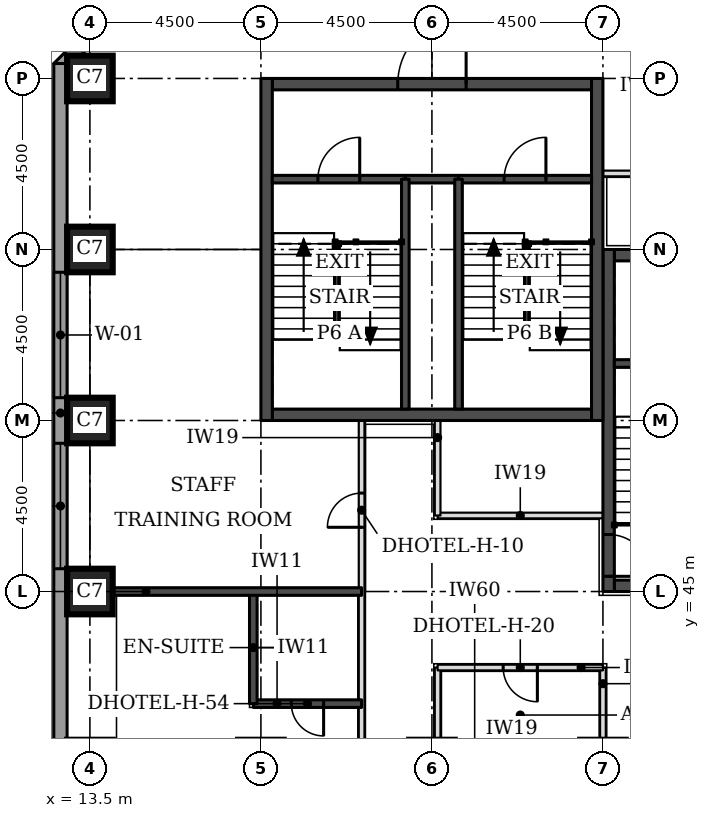
"""IFC4 building model, lengths in metres.
Left out: names, types, materials, properties, quantities, classifications, styles, units other than length and angle.
Written with IfcOpenShell. Run it as: python <this file> out.ifc"""

import sys

from ifc_helpers import new_model, si_unit, direction, frame, frame_2d, origin, origin_2d, place, context, subcontext, project, spatial, rectangle, extrude, element, fill, save


model = new_model("IFC4")
c1 = context("Model", 3, precision=1e-05, world=origin(), true_north=direction((0.0, 1.0)))
c2 = subcontext(c1, "Body", "Model", "MODEL_VIEW")
j1 = project(units=[si_unit("LENGTHUNIT", "METRE"), si_unit("PLANEANGLEUNIT", "RADIAN")], contexts=[c1])
p1 = place(None, origin())
s1 = spatial("IfcSite", under=j1, at=p1, CompositionType="ELEMENT")
p2 = place(p1, origin())
s2 = spatial("IfcBuilding", under=s1, at=p2, CompositionType="ELEMENT")
p3 = place(p2, frame((0.0, 0.0, 46.2)))
s3 = spatial("IfcBuildingStorey", under=s2, at=p3, CompositionType="ELEMENT", Elevation=46.2)
for number, where, z_axis, x_axis in (
    (1, (13.5, 45.0, 0.0), (0.0, 0.0, 1.0), (1.0, 0.0, 0.0)),
    (2, (13.5, 49.5, 0.0), (0.0, 0.0, 1.0), (1.0, 0.0, 0.0)),
    (3, (13.5, 54.0, 0.0), (0.0, 0.0, 1.0), (1.0, 0.0, 0.0)),
    (4, (13.5, 58.5, 0.0), (0.0, 0.0, 1.0), (1.0, 0.0, 0.0)),
):
    element("IfcColumn", number, at=place(p3, frame(where, z_axis=z_axis, x_axis=x_axis)), inside=s3, PredefinedType="COLUMN", context=c2, shape_type="SweptSolid", body=[
        extrude(rectangle(XDim=1.2, YDim=1.2, at=origin_2d()), origin(), (0.0, 0.0, 1.0), 3.3),
    ])
p4 = place(p3, frame((27.3, 45.15, 0.0), z_axis=(0.0, 0.0, 1.0), x_axis=(1.0, 0.0, 0.0)))
e5 = element("IfcWall", 5, at=p4, inside=s3, PredefinedType="SHEAR", context=c2, shape_type="SweptSolid", body=[
    extrude(rectangle(XDim=8.4, YDim=0.3, at=frame_2d((4.2, 0.0))), origin(), (0.0, 0.0, 1.0), 3.3),
])
p5 = place(p4, frame((5.2, 0.0, 0.0)))
e6 = element("IfcOpeningElement", 6, at=p5, cuts=e5, PredefinedType="OPENING", context=c2, shape_type="SweptSolid", body=[
    extrude(rectangle(XDim=1.0, YDim=2.1, at=frame_2d((0.5, 1.05))), frame((0.0, 0.16, 0.0), z_axis=(0.0, -1.0, 0.0), x_axis=(1.0, 0.0, 0.0)), (0.0, 0.0, 1.0), 0.32),
])
p6 = place(p3, frame((27.3, 53.85, 0.0), z_axis=(0.0, 0.0, 1.0), x_axis=(1.0, 0.0, 0.0)))
e7 = element("IfcWall", 7, at=p6, inside=s3, PredefinedType="SHEAR", context=c2, shape_type="SweptSolid", body=[
    extrude(rectangle(XDim=8.4, YDim=0.3, at=frame_2d((4.2, 0.0))), origin(), (0.0, 0.0, 1.0), 3.3),
])
p7 = place(p6, frame((6.4, 0.0, 0.0)))
e8 = element("IfcOpeningElement", 8, at=p7, cuts=e7, PredefinedType="OPENING", context=c2, shape_type="SweptSolid", body=[
    extrude(rectangle(XDim=1.1, YDim=2.1, at=frame_2d((0.55, 1.05))), frame((0.0, 0.16, 0.0), z_axis=(0.0, -1.0, 0.0), x_axis=(1.0, 0.0, 0.0)), (0.0, 0.0, 1.0), 0.32),
])
p8 = place(p3, frame((27.15, 45.0, 0.0), z_axis=(0.0, 0.0, 1.0), x_axis=(0.0, 1.0, 0.0)))
e9 = element("IfcWall", 9, at=p8, inside=s3, PredefinedType="SHEAR", context=c2, shape_type="SweptSolid", body=[
    extrude(rectangle(XDim=9.0, YDim=0.3, at=frame_2d((4.5, 0.0))), origin(), (0.0, 0.0, 1.0), 3.3),
])
p9 = place(p8, frame((0.4, 0.0, 0.0)))
e10 = element("IfcOpeningElement", 10, at=p9, cuts=e9, PredefinedType="OPENING", context=c2, shape_type="SweptSolid", body=[
    extrude(rectangle(XDim=1.1, YDim=2.1, at=frame_2d((0.55, 1.05))), frame((0.0, 0.16, 0.0), z_axis=(0.0, -1.0, 0.0), x_axis=(1.0, 0.0, 0.0)), (0.0, 0.0, 1.0), 0.32),
])
p10 = place(p3, frame((18.3, 49.65, 0.0), z_axis=(0.0, 0.0, 1.0), x_axis=(1.0, 0.0, 0.0)))
e11 = element("IfcWall", 11, at=p10, inside=s3, PredefinedType="SHEAR", context=c2, shape_type="SweptSolid", body=[
    extrude(rectangle(XDim=8.4, YDim=0.3, at=frame_2d((4.2, 0.0))), origin(), (0.0, 0.0, 1.0), 3.3),
])
p11 = place(p3, frame((18.3, 58.35, 0.0), z_axis=(0.0, 0.0, 1.0), x_axis=(1.0, 0.0, 0.0)))
e12 = element("IfcWall", 12, at=p11, inside=s3, PredefinedType="SHEAR", context=c2, shape_type="SweptSolid", body=[
    extrude(rectangle(XDim=8.4, YDim=0.3, at=frame_2d((4.2, 0.0))), origin(), (0.0, 0.0, 1.0), 3.3),
])
p12 = place(p11, frame((3.3, 0.0, 0.0)))
e13 = element("IfcOpeningElement", 13, at=p12, cuts=e12, PredefinedType="OPENING", context=c2, shape_type="SweptSolid", body=[
    extrude(rectangle(XDim=1.8, YDim=2.1, at=frame_2d((0.9, 1.05))), frame((0.0, 0.16, 0.0), z_axis=(0.0, -1.0, 0.0), x_axis=(1.0, 0.0, 0.0)), (0.0, 0.0, 1.0), 0.32),
])
for number, where, z_axis, x_axis in (
    (14, (18.15, 49.5, 0.0), (0.0, 0.0, 1.0), (0.0, 1.0, 0.0)),
    (15, (26.85, 49.5, 0.0), (0.0, 0.0, 1.0), (0.0, 1.0, 0.0)),
):
    element("IfcWall", number, at=place(p3, frame(where, z_axis=z_axis, x_axis=x_axis)), inside=s3, PredefinedType="SHEAR", context=c2, shape_type="SweptSolid", body=[
        extrude(rectangle(XDim=9.0, YDim=0.3, at=frame_2d((4.5, 0.0))), origin(), (0.0, 0.0, 1.0), 3.3),
    ])
p13 = place(p3, frame((17.73, 63.826, 0.0), z_axis=(0.0, 0.0, 1.0), x_axis=(-0.707106781187, -0.707106781187, 0.0)))
e16 = element("IfcWall", 16, at=p13, inside=s3, PredefinedType="STANDARD", context=c2, shape_type="SweptSolid", body=[
    extrude(rectangle(XDim=7.151, YDim=0.35, at=frame_2d((3.576, 0.0))), origin(), (0.0, 0.0, 1.0), 3.055),
])
p14 = place(p13, frame((1.926, 0.0, 0.8)))
e17 = element("IfcOpeningElement", 17, at=p14, cuts=e16, PredefinedType="OPENING", context=c2, shape_type="SweptSolid", body=[
    extrude(rectangle(XDim=3.3, YDim=1.5, at=frame_2d((1.65, 0.75))), frame((0.0, 0.185, 0.0), z_axis=(0.0, -1.0, 0.0), x_axis=(1.0, 0.0, 0.0)), (0.0, 0.0, 1.0), 0.37),
])
p15 = place(p3, frame((12.725, 58.894, 0.0), z_axis=(0.0, 0.0, 1.0), x_axis=(0.0, -1.0, 0.0)))
e18 = element("IfcWall", 18, at=p15, inside=s3, PredefinedType="STANDARD", context=c2, shape_type="SweptSolid", body=[
    extrude(rectangle(XDim=18.394, YDim=0.35, at=frame_2d((9.197, 0.0))), origin(), (0.0, 0.0, 1.0), 3.055),
])
p16 = place(p15, frame((5.493, 0.0, 0.8)))
e19 = element("IfcOpeningElement", 19, at=p16, cuts=e18, PredefinedType="OPENING", context=c2, shape_type="SweptSolid", body=[
    extrude(rectangle(XDim=3.3, YDim=1.5, at=frame_2d((1.65, 0.75))), frame((0.0, 0.185, 0.0), z_axis=(0.0, -1.0, 0.0), x_axis=(1.0, 0.0, 0.0)), (0.0, 0.0, 1.0), 0.37),
])
p17 = place(p15, frame((9.993, 0.0, 0.8)))
e20 = element("IfcOpeningElement", 20, at=p17, cuts=e18, PredefinedType="OPENING", context=c2, shape_type="SweptSolid", body=[
    extrude(rectangle(XDim=3.3, YDim=1.5, at=frame_2d((1.65, 0.75))), frame((0.0, 0.185, 0.0), z_axis=(0.0, -1.0, 0.0), x_axis=(1.0, 0.0, 0.0)), (0.0, 0.0, 1.0), 0.37),
])
p18 = place(p3, frame((20.65, 25.15, 0.0), z_axis=(0.0, 0.0, 1.0), x_axis=(0.0, 1.0, 0.0)))
e21 = element("IfcWall", 21, at=p18, inside=s3, PredefinedType="PARTITIONING", context=c2, shape_type="SweptSolid", body=[
    extrude(rectangle(XDim=24.35, YDim=0.15, at=frame_2d((12.175, 0.0))), origin(), (0.0, 0.0, 1.0), 3.08),
])
p19 = place(p18, frame((0.347, 0.0, 0.0)))
e22 = element("IfcOpeningElement", 22, at=p19, cuts=e21, PredefinedType="OPENING", context=c2, shape_type="SweptSolid", body=[
    extrude(rectangle(XDim=1.0, YDim=2.1, at=frame_2d((0.5, 1.05))), frame((0.0, 0.085, 0.0), z_axis=(0.0, -1.0, 0.0), x_axis=(1.0, 0.0, 0.0)), (0.0, 0.0, 1.0), 0.17),
])
p20 = place(p18, frame((7.075, 0.0, 0.0)))
e23 = element("IfcOpeningElement", 23, at=p20, cuts=e21, PredefinedType="OPENING", context=c2, shape_type="SweptSolid", body=[
    extrude(rectangle(XDim=1.0, YDim=2.1, at=frame_2d((0.5, 1.05))), frame((0.0, 0.085, 0.0), z_axis=(0.0, -1.0, 0.0), x_axis=(1.0, 0.0, 0.0)), (0.0, 0.0, 1.0), 0.17),
])
p21 = place(p18, frame((13.375, 0.0, 0.0)))
e24 = element("IfcOpeningElement", 24, at=p21, cuts=e21, PredefinedType="OPENING", context=c2, shape_type="SweptSolid", body=[
    extrude(rectangle(XDim=1.0, YDim=2.1, at=frame_2d((0.5, 1.05))), frame((0.0, 0.085, 0.0), z_axis=(0.0, -1.0, 0.0), x_axis=(1.0, 0.0, 0.0)), (0.0, 0.0, 1.0), 0.17),
])
p22 = place(p18, frame((21.54, 0.0, 0.0)))
e25 = element("IfcOpeningElement", 25, at=p22, cuts=e21, PredefinedType="OPENING", context=c2, shape_type="SweptSolid", body=[
    extrude(rectangle(XDim=0.9, YDim=2.1, at=frame_2d((0.45, 1.05))), frame((0.0, 0.085, 0.0), z_axis=(0.0, -1.0, 0.0), x_axis=(1.0, 0.0, 0.0)), (0.0, 0.0, 1.0), 0.17),
])
p23 = place(p3, frame((22.65, 27.15, 0.0), z_axis=(0.0, 0.0, 1.0), x_axis=(0.0, 1.0, 0.0)))
e26 = element("IfcWall", 26, at=p23, inside=s3, PredefinedType="PARTITIONING", context=c2, shape_type="SweptSolid", body=[
    extrude(rectangle(XDim=15.85, YDim=0.15, at=frame_2d((7.925, 0.0))), origin(), (0.0, 0.0, 1.0), 3.08),
])
p24 = place(p23, frame((2.55, 0.0, 0.0)))
e27 = element("IfcOpeningElement", 27, at=p24, cuts=e26, PredefinedType="OPENING", context=c2, shape_type="SweptSolid", body=[
    extrude(rectangle(XDim=0.9, YDim=2.1, at=frame_2d((0.45, 1.05))), frame((0.0, 0.085, 0.0), z_axis=(0.0, -1.0, 0.0), x_axis=(1.0, 0.0, 0.0)), (0.0, 0.0, 1.0), 0.17),
])
p25 = place(p23, frame((9.225, 0.0, 0.0)))
e28 = element("IfcOpeningElement", 28, at=p25, cuts=e26, PredefinedType="OPENING", context=c2, shape_type="SweptSolid", body=[
    extrude(rectangle(XDim=0.9, YDim=2.1, at=frame_2d((0.45, 1.05))), frame((0.0, 0.085, 0.0), z_axis=(0.0, -1.0, 0.0), x_axis=(1.0, 0.0, 0.0)), (0.0, 0.0, 1.0), 0.17),
])
p26 = place(p3, frame((27.0, 40.55, 0.0), z_axis=(0.0, 0.0, 1.0), x_axis=(0.0, 1.0, 0.0)))
e29 = element("IfcWall", 29, at=p26, inside=s3, PredefinedType="PARTITIONING", context=c2, shape_type="SweptSolid", body=[
    extrude(rectangle(XDim=2.45, YDim=0.15, at=frame_2d((1.225, 0.0))), origin(), (0.0, 0.0, 1.0), 3.08),
])
p27 = place(p3, frame((22.65, 43.0, 0.0), z_axis=(0.0, 0.0, 1.0), x_axis=(1.0, 0.0, 0.0)))
e30 = element("IfcWall", 30, at=p27, inside=s3, PredefinedType="PARTITIONING", context=c2, shape_type="SweptSolid", body=[
    extrude(rectangle(XDim=4.35, YDim=0.15, at=frame_2d((2.175, 0.0))), origin(), (0.0, 0.0, 1.0), 3.08),
])
p28 = place(p27, frame((1.725, 0.0, 0.0)))
e31 = element("IfcOpeningElement", 31, at=p28, cuts=e30, PredefinedType="OPENING", context=c2, shape_type="SweptSolid", body=[
    extrude(rectangle(XDim=0.9, YDim=2.1, at=frame_2d((0.45, 1.05))), frame((0.0, 0.085, 0.0), z_axis=(0.0, -1.0, 0.0), x_axis=(1.0, 0.0, 0.0)), (0.0, 0.0, 1.0), 0.17),
])
p29 = place(p3, frame((22.65, 47.0, 0.0), z_axis=(0.0, 0.0, 1.0), x_axis=(1.0, 0.0, 0.0)))
e32 = element("IfcWall", 32, at=p29, inside=s3, PredefinedType="PARTITIONING", context=c2, shape_type="SweptSolid", body=[
    extrude(rectangle(XDim=4.35, YDim=0.15, at=frame_2d((2.175, 0.0))), origin(), (0.0, 0.0, 1.0), 3.08),
])
p30 = place(p3, frame((22.65, 47.0, 0.0), z_axis=(0.0, 0.0, 1.0), x_axis=(0.0, 1.0, 0.0)))
e33 = element("IfcWall", 33, at=p30, inside=s3, PredefinedType="PARTITIONING", context=c2, shape_type="SweptSolid", body=[
    extrude(rectangle(XDim=2.5, YDim=0.15, at=frame_2d((1.25, 0.0))), origin(), (0.0, 0.0, 1.0), 3.08),
])
p31 = place(p3, frame((27.0, 56.0, 0.0), z_axis=(0.0, 0.0, 1.0), x_axis=(1.0, 0.0, 0.0)))
e34 = element("IfcWall", 34, at=p31, inside=s3, PredefinedType="PARTITIONING", context=c2, shape_type="SweptSolid", body=[
    extrude(rectangle(XDim=16.0, YDim=0.15, at=frame_2d((8.0, 0.0))), origin(), (0.0, 0.0, 1.0), 3.08),
])
p32 = place(p31, frame((7.425, 0.0, 0.0)))
e35 = element("IfcOpeningElement", 35, at=p32, cuts=e34, PredefinedType="OPENING", context=c2, shape_type="SweptSolid", body=[
    extrude(rectangle(XDim=1.0, YDim=2.1, at=frame_2d((0.5, 1.05))), frame((0.0, 0.085, 0.0), z_axis=(0.0, -1.0, 0.0), x_axis=(1.0, 0.0, 0.0)), (0.0, 0.0, 1.0), 0.17),
])
p33 = place(p31, frame((1.91, 0.0, 0.0)))
e36 = element("IfcOpeningElement", 36, at=p33, cuts=e34, PredefinedType="OPENING", context=c2, shape_type="SweptSolid", body=[
    extrude(rectangle(XDim=0.9, YDim=2.1, at=frame_2d((0.45, 1.05))), frame((0.0, 0.085, 0.0), z_axis=(0.0, -1.0, 0.0), x_axis=(1.0, 0.0, 0.0)), (0.0, 0.0, 1.0), 0.17),
])
p34 = place(p3, frame((17.8, 42.05, 0.0), z_axis=(0.0, 0.0, 1.0), x_axis=(1.0, 0.0, 0.0)))
e37 = element("IfcWall", 37, at=p34, inside=s3, PredefinedType="SOLIDWALL", context=c2, shape_type="SweptSolid", body=[
    extrude(rectangle(XDim=2.85, YDim=0.2, at=frame_2d((1.425, 0.0))), origin(), (0.0, 0.0, 1.0), 3.08),
])
p35 = place(p34, frame((1.0, 0.0, 0.0)))
e38 = element("IfcOpeningElement", 38, at=p35, cuts=e37, PredefinedType="OPENING", context=c2, shape_type="SweptSolid", body=[
    extrude(rectangle(XDim=0.85, YDim=2.1, at=frame_2d((0.425, 1.05))), frame((0.0, 0.11, 0.0), z_axis=(0.0, -1.0, 0.0), x_axis=(1.0, 0.0, 0.0)), (0.0, 0.0, 1.0), 0.22),
])
p36 = place(p3, frame((17.8, 42.05, 0.0), z_axis=(0.0, 0.0, 1.0), x_axis=(0.0, 1.0, 0.0)))
e39 = element("IfcWall", 39, at=p36, inside=s3, PredefinedType="SOLIDWALL", context=c2, shape_type="SweptSolid", body=[
    extrude(rectangle(XDim=2.95, YDim=0.2, at=frame_2d((1.475, 0.0))), origin(), (0.0, 0.0, 1.0), 3.08),
])
p37 = place(p3, frame((14.1, 45.0, 0.0), z_axis=(0.0, 0.0, 1.0), x_axis=(1.0, 0.0, 0.0)))
e40 = element("IfcWall", 40, at=p37, inside=s3, PredefinedType="SOLIDWALL", context=c2, shape_type="SweptSolid", body=[
    extrude(rectangle(XDim=6.55, YDim=0.2, at=frame_2d((3.275, 0.0))), origin(), (0.0, 0.0, 1.0), 3.08),
])
p38 = place(p3, frame((27.3, 51.0, 0.0), z_axis=(0.0, 0.0, 1.0), x_axis=(1.0, 0.0, 0.0)))
e41 = element("IfcWall", 41, at=p38, inside=s3, PredefinedType="SOLIDWALL", context=c2, shape_type="SweptSolid", body=[
    extrude(rectangle(XDim=3.0, YDim=0.2, at=frame_2d((1.5, 0.0))), origin(), (0.0, 0.0, 1.0), 3.08),
])
p39 = place(p3, frame((21.8, 55.85, 0.0), z_axis=(0.0, 0.0, 1.0), x_axis=(1.0, 0.0, 0.0)))
e42 = element("IfcWall", 42, at=p39, inside=s3, PredefinedType="SOLIDWALL", context=c2, shape_type="SweptSolid", body=[
    extrude(rectangle(XDim=1.4, YDim=0.2, at=frame_2d((0.7, 0.0))), origin(), (0.0, 0.0, 1.0), 3.08),
])
p40 = place(p3, frame((18.3, 55.85, 0.0), z_axis=(0.0, 0.0, 1.0), x_axis=(1.0, 0.0, 0.0)))
e43 = element("IfcWall", 43, at=p40, inside=s3, PredefinedType="SOLIDWALL", context=c2, shape_type="SweptSolid", body=[
    extrude(rectangle(XDim=3.5, YDim=0.2, at=frame_2d((1.75, 0.0))), origin(), (0.0, 0.0, 1.0), 3.08),
])
p41 = place(p40, frame((1.2, 0.0, 0.0)))
e44 = element("IfcOpeningElement", 44, at=p41, cuts=e43, PredefinedType="OPENING", context=c2, shape_type="SweptSolid", body=[
    extrude(rectangle(XDim=1.1, YDim=2.1, at=frame_2d((0.55, 1.05))), frame((0.0, 0.11, 0.0), z_axis=(0.0, -1.0, 0.0), x_axis=(1.0, 0.0, 0.0)), (0.0, 0.0, 1.0), 0.22),
])
p42 = place(p3, frame((23.2, 55.85, 0.0), z_axis=(0.0, 0.0, 1.0), x_axis=(1.0, 0.0, 0.0)))
e45 = element("IfcWall", 45, at=p42, inside=s3, PredefinedType="SOLIDWALL", context=c2, shape_type="SweptSolid", body=[
    extrude(rectangle(XDim=3.5, YDim=0.2, at=frame_2d((1.75, 0.0))), origin(), (0.0, 0.0, 1.0), 3.08),
])
p43 = place(p42, frame((1.2, 0.0, 0.0)))
e46 = element("IfcOpeningElement", 46, at=p43, cuts=e45, PredefinedType="OPENING", context=c2, shape_type="SweptSolid", body=[
    extrude(rectangle(XDim=1.1, YDim=2.1, at=frame_2d((0.55, 1.05))), frame((0.0, 0.11, 0.0), z_axis=(0.0, -1.0, 0.0), x_axis=(1.0, 0.0, 0.0)), (0.0, 0.0, 1.0), 0.22),
])
for number, where, z_axis, x_axis in (
    (47, (21.8, 49.8, 0.0), (0.0, 0.0, 1.0), (0.0, 1.0, 0.0)),
    (48, (23.2, 49.8, 0.0), (0.0, 0.0, 1.0), (0.0, 1.0, 0.0)),
):
    element("IfcWall", number, at=place(p3, frame(where, z_axis=z_axis, x_axis=x_axis)), inside=s3, PredefinedType="SOLIDWALL", context=c2, shape_type="SweptSolid", body=[
        extrude(rectangle(XDim=6.05, YDim=0.2, at=frame_2d((3.025, 0.0))), origin(), (0.0, 0.0, 1.0), 3.08),
    ])
p44 = place(p16, origin())
e49 = element("IfcWindow", 49, at=p44, inside=s3, PartitioningType="SINGLE_PANEL", PredefinedType="WINDOW", context=c2, shape_type="SweptSolid", body=[
    extrude(rectangle(XDim=3.3, YDim=1.5, at=frame_2d((1.65, 0.75))), frame((0.0, 0.085, 0.0), z_axis=(0.0, -1.0, 0.0), x_axis=(1.0, 0.0, 0.0)), (0.0, 0.0, 1.0), 0.06),
])
fill(e19, e49)
p45 = place(p17, origin())
e50 = element("IfcWindow", 50, at=p45, inside=s3, PartitioningType="SINGLE_PANEL", PredefinedType="WINDOW", context=c2, shape_type="SweptSolid", body=[
    extrude(rectangle(XDim=3.3, YDim=1.5, at=frame_2d((1.65, 0.75))), frame((0.0, 0.085, 0.0), z_axis=(0.0, -1.0, 0.0), x_axis=(1.0, 0.0, 0.0)), (0.0, 0.0, 1.0), 0.06),
])
fill(e20, e50)
p46 = place(p35, frame((0.85, 0.0, 0.0), z_axis=(0.0, 0.0, 1.0), x_axis=(-1.0, 0.0, 0.0)))
e51 = element("IfcDoor", 51, at=p46, inside=s3, OperationType="SINGLE_SWING_LEFT", PredefinedType="DOOR", context=c2, shape_type="SweptSolid", body=[
    extrude(rectangle(XDim=0.85, YDim=2.1, at=frame_2d((0.425, 1.05))), frame((0.0, 0.025, 0.0), z_axis=(0.0, -1.0, 0.0), x_axis=(1.0, 0.0, 0.0)), (0.0, 0.0, 1.0), 0.05),
])
fill(e38, e51)
p47 = place(p28, frame((0.9, 0.0, 0.0), z_axis=(0.0, 0.0, 1.0), x_axis=(-1.0, 0.0, 0.0)))
e52 = element("IfcDoor", 52, at=p47, inside=s3, OperationType="SINGLE_SWING_LEFT", PredefinedType="DOOR", context=c2, shape_type="SweptSolid", body=[
    extrude(rectangle(XDim=0.9, YDim=2.1, at=frame_2d((0.45, 1.05))), frame((0.0, 0.025, 0.0), z_axis=(0.0, -1.0, 0.0), x_axis=(1.0, 0.0, 0.0)), (0.0, 0.0, 1.0), 0.05),
])
fill(e31, e52)
p48 = place(p22, origin())
e53 = element("IfcDoor", 53, at=p48, inside=s3, OperationType="SINGLE_SWING_LEFT", PredefinedType="DOOR", context=c2, shape_type="SweptSolid", body=[
    extrude(rectangle(XDim=0.9, YDim=2.1, at=frame_2d((0.45, 1.05))), frame((0.0, 0.025, 0.0), z_axis=(0.0, -1.0, 0.0), x_axis=(1.0, 0.0, 0.0)), (0.0, 0.0, 1.0), 0.05),
])
fill(e25, e53)
p49 = place(p9, frame((1.1, 0.0, 0.0), z_axis=(0.0, 0.0, 1.0), x_axis=(-1.0, 0.0, 0.0)))
e54 = element("IfcDoor", 54, at=p49, inside=s3, OperationType="SINGLE_SWING_RIGHT", PredefinedType="DOOR", context=c2, shape_type="SweptSolid", body=[
    extrude(rectangle(XDim=1.1, YDim=2.1, at=frame_2d((0.55, 1.05))), frame((0.0, 0.025, 0.0), z_axis=(0.0, -1.0, 0.0), x_axis=(1.0, 0.0, 0.0)), (0.0, 0.0, 1.0), 0.05),
])
fill(e10, e54)
p50 = place(p41, origin())
e55 = element("IfcDoor", 55, at=p50, inside=s3, OperationType="SINGLE_SWING_RIGHT", PredefinedType="DOOR", context=c2, shape_type="SweptSolid", body=[
    extrude(rectangle(XDim=1.1, YDim=2.1, at=frame_2d((0.55, 1.05))), frame((0.0, 0.025, 0.0), z_axis=(0.0, -1.0, 0.0), x_axis=(1.0, 0.0, 0.0)), (0.0, 0.0, 1.0), 0.05),
])
fill(e44, e55)
p51 = place(p43, origin())
e56 = element("IfcDoor", 56, at=p51, inside=s3, OperationType="SINGLE_SWING_RIGHT", PredefinedType="DOOR", context=c2, shape_type="SweptSolid", body=[
    extrude(rectangle(XDim=1.1, YDim=2.1, at=frame_2d((0.55, 1.05))), frame((0.0, 0.025, 0.0), z_axis=(0.0, -1.0, 0.0), x_axis=(1.0, 0.0, 0.0)), (0.0, 0.0, 1.0), 0.05),
])
fill(e46, e56)
p52 = place(p12, origin())
e57 = element("IfcDoor", 57, at=p52, inside=s3, OperationType="SINGLE_SWING_RIGHT", PredefinedType="DOOR", context=c2, shape_type="SweptSolid", body=[
    extrude(rectangle(XDim=1.8, YDim=2.1, at=frame_2d((0.9, 1.05))), frame((0.0, 0.025, 0.0), z_axis=(0.0, -1.0, 0.0), x_axis=(1.0, 0.0, 0.0)), (0.0, 0.0, 1.0), 0.05),
])
fill(e13, e57)
save(model, sys.argv[1])
